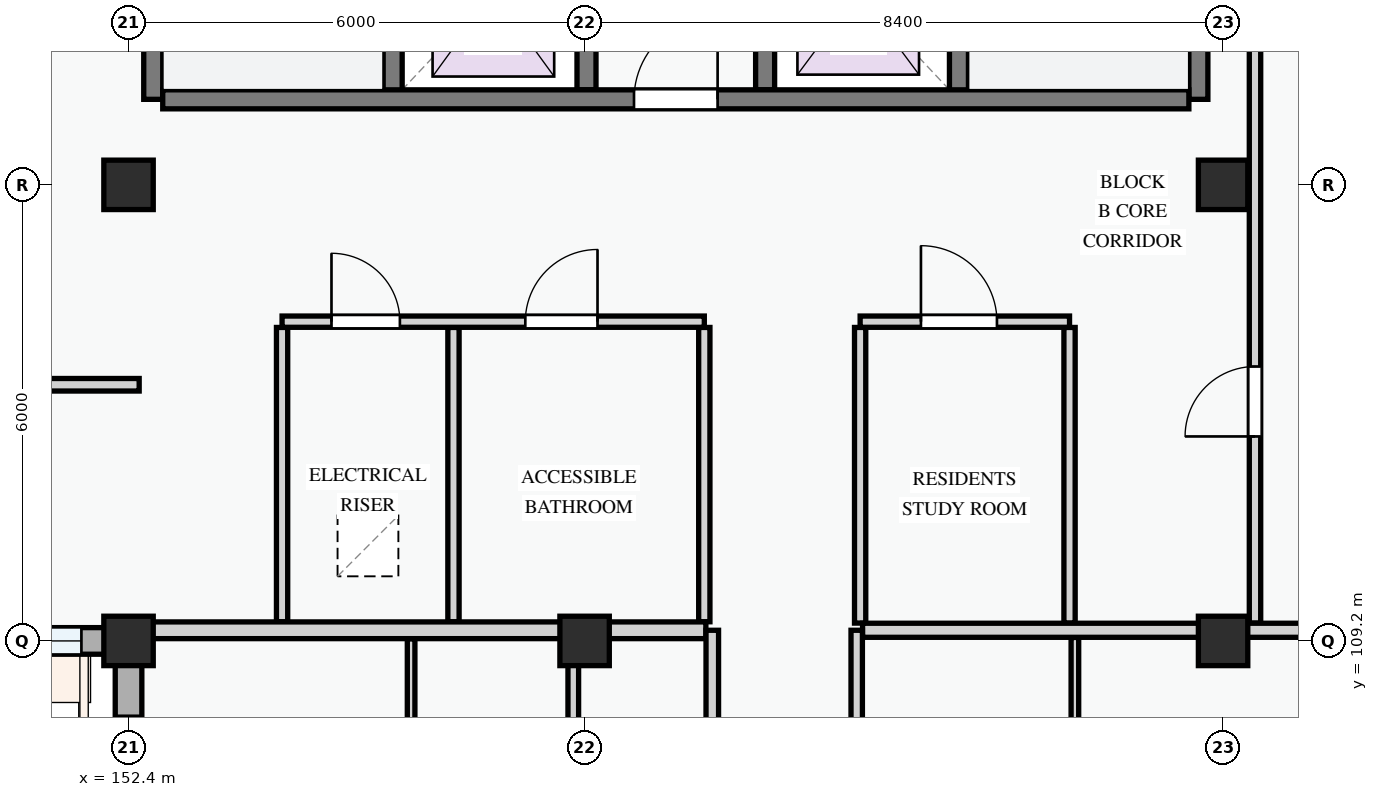
"""IFC4 building model, lengths in metres.
Left out: names, types, materials, properties, quantities, classifications, styles, units other than length and angle.
Written with IfcOpenShell. Run it as: python <this file> out.ifc"""

import sys

from ifc_helpers import new_model, si_unit, direction, frame, frame_2d, origin, origin_2d, place, context, subcontext, project, spatial, rectangle, extrude, element, fill, save


model = new_model("IFC4")
c1 = context("Model", 3, precision=1e-05, world=origin(), true_north=direction((0.0, 1.0)))
c2 = subcontext(c1, "Body", "Model", "MODEL_VIEW")
j1 = project(units=[si_unit("LENGTHUNIT", "METRE"), si_unit("PLANEANGLEUNIT", "RADIAN")], contexts=[c1])
p1 = place(None, origin())
s1 = spatial("IfcSite", under=j1, at=p1, CompositionType="ELEMENT")
p2 = place(p1, origin())
s2 = spatial("IfcBuilding", under=s1, at=p2, CompositionType="ELEMENT")
p3 = place(p2, frame((0.0, 0.0, 11.4)))
s3 = spatial("IfcBuildingStorey", under=s2, at=p3, CompositionType="ELEMENT", Elevation=11.4)
for number, where, z_axis, x_axis in (
    (1, (152.4, 109.2, 0.0), (0.0, 0.0, 1.0), (1.0, 0.0, 0.0)),
    (2, (152.4, 115.2, 0.0), (0.0, 0.0, 1.0), (1.0, 0.0, 0.0)),
    (3, (158.4, 109.2, 0.0), (0.0, 0.0, 1.0), (1.0, 0.0, 0.0)),
    (4, (166.8, 109.2, 0.0), (0.0, 0.0, 1.0), (1.0, 0.0, 0.0)),
    (5, (166.8, 115.2, 0.0), (0.0, 0.0, 1.0), (1.0, 0.0, 0.0)),
):
    element("IfcColumn", number, at=place(p3, frame(where, z_axis=z_axis, x_axis=x_axis)), inside=s3, PredefinedType="COLUMN", context=c2, shape_type="SweptSolid", body=[
        extrude(rectangle(XDim=0.65, YDim=0.65, at=origin_2d()), origin(), (0.0, 0.0, 1.0), 3.3),
    ])
p4 = place(p3, frame((144.0, 109.2, 0.0), z_axis=(0.0, 0.0, 1.0), x_axis=(1.0, 0.0, 0.0)))
e6 = element("IfcWall", 6, at=p4, inside=s3, PredefinedType="STANDARD", context=c2, shape_type="SweptSolid", body=[
    extrude(rectangle(XDim=8.4, YDim=0.35, at=frame_2d((4.2, 0.0))), origin(), (0.0, 0.0, 1.0), 2.375),
])
p5 = place(p4, frame((0.99, 0.0, 0.78)))
e7 = element("IfcOpeningElement", 7, at=p5, cuts=e6, PredefinedType="OPENING", context=c2, shape_type="SweptSolid", body=[
    extrude(rectangle(XDim=1.4, YDim=1.45, at=frame_2d((0.7, 0.725))), frame((0.0, 0.185, 0.0), z_axis=(0.0, -1.0, 0.0), x_axis=(1.0, 0.0, 0.0)), (0.0, 0.0, 1.0), 0.37),
])
p6 = place(p4, frame((3.925, 0.0, 0.78)))
e8 = element("IfcOpeningElement", 8, at=p6, cuts=e6, PredefinedType="OPENING", context=c2, shape_type="SweptSolid", body=[
    extrude(rectangle(XDim=1.25, YDim=1.45, at=frame_2d((0.625, 0.725))), frame((0.0, 0.185, 0.0), z_axis=(0.0, -1.0, 0.0), x_axis=(1.0, 0.0, 0.0)), (0.0, 0.0, 1.0), 0.37),
])
p7 = place(p4, frame((6.48, 0.0, 0.78)))
e9 = element("IfcOpeningElement", 9, at=p7, cuts=e6, PredefinedType="OPENING", context=c2, shape_type="SweptSolid", body=[
    extrude(rectangle(XDim=1.3, YDim=1.4, at=frame_2d((0.65, 0.7))), frame((0.0, 0.185, 0.0), z_axis=(0.0, -1.0, 0.0), x_axis=(1.0, 0.0, 0.0)), (0.0, 0.0, 1.0), 0.37),
])
p8 = place(p3, frame((152.4, 109.2, 0.0), z_axis=(0.0, 0.0, 1.0), x_axis=(0.0, -1.0, 0.0)))
e10 = element("IfcWall", 10, at=p8, inside=s3, PredefinedType="STANDARD", context=c2, shape_type="SweptSolid", body=[
    extrude(rectangle(XDim=8.4, YDim=0.35, at=frame_2d((4.2, 0.0))), origin(), (0.0, 0.0, 1.0), 2.425),
])
p9 = place(p8, frame((0.985, 0.0, 0.78)))
e11 = element("IfcOpeningElement", 11, at=p9, cuts=e10, PredefinedType="OPENING", context=c2, shape_type="SweptSolid", body=[
    extrude(rectangle(XDim=0.9, YDim=1.2, at=frame_2d((0.45, 0.6))), frame((0.0, 0.185, 0.0), z_axis=(0.0, -1.0, 0.0), x_axis=(1.0, 0.0, 0.0)), (0.0, 0.0, 1.0), 0.37),
])
p10 = place(p8, frame((3.035, 0.0, 0.78)))
e12 = element("IfcOpeningElement", 12, at=p10, cuts=e10, PredefinedType="OPENING", context=c2, shape_type="SweptSolid", body=[
    extrude(rectangle(XDim=1.5, YDim=1.5, at=frame_2d((0.75, 0.75))), frame((0.0, 0.185, 0.0), z_axis=(0.0, -1.0, 0.0), x_axis=(1.0, 0.0, 0.0)), (0.0, 0.0, 1.0), 0.37),
])
p11 = place(p8, frame((5.93, 0.0, 0.78)))
e13 = element("IfcOpeningElement", 13, at=p11, cuts=e10, PredefinedType="OPENING", context=c2, shape_type="SweptSolid", body=[
    extrude(rectangle(XDim=1.38, YDim=1.48, at=frame_2d((0.69, 0.74))), frame((0.0, 0.185, 0.0), z_axis=(0.0, -1.0, 0.0), x_axis=(1.0, 0.0, 0.0)), (0.0, 0.0, 1.0), 0.37),
])
p12 = place(p3, frame((155.875, 123.25, 0.0), z_axis=(0.0, 0.0, 1.0), x_axis=(0.0, -1.0, 0.0)))
e14 = element("IfcWall", 14, at=p12, inside=s3, PredefinedType="SHEAR", context=c2, shape_type="SweptSolid", body=[
    extrude(rectangle(XDim=6.925, YDim=0.25, at=frame_2d((3.462, 0.0))), origin(), (0.0, 0.0, 1.0), 3.0),
])
p13 = place(p12, frame((0.35, 0.0, 0.0)))
e15 = element("IfcOpeningElement", 15, at=p13, cuts=e14, PredefinedType="OPENING", context=c2, shape_type="SweptSolid", body=[
    extrude(rectangle(XDim=0.95, YDim=2.1, at=frame_2d((0.475, 1.05))), frame((0.0, 0.135, 0.0), z_axis=(0.0, -1.0, 0.0), x_axis=(1.0, 0.0, 0.0)), (0.0, 0.0, 1.0), 0.27),
])
p14 = place(p3, frame((152.725, 123.4, 0.0), z_axis=(0.0, 0.0, 1.0), x_axis=(0.0, -1.0, 0.0)))
e16 = element("IfcWall", 16, at=p14, inside=s3, PredefinedType="SHEAR", context=c2, shape_type="SweptSolid", body=[
    extrude(rectangle(XDim=7.075, YDim=0.25, at=frame_2d((3.538, 0.0))), origin(), (0.0, 0.0, 1.0), 3.0),
])
p15 = place(p3, frame((166.475, 123.25, 0.0), z_axis=(0.0, 0.0, 1.0), x_axis=(0.0, -1.0, 0.0)))
e17 = element("IfcWall", 17, at=p15, inside=s3, PredefinedType="SHEAR", context=c2, shape_type="SweptSolid", body=[
    extrude(rectangle(XDim=6.925, YDim=0.25, at=frame_2d((3.462, 0.0))), origin(), (0.0, 0.0, 1.0), 3.0),
])
p16 = place(p3, frame((163.325, 123.25, 0.0), z_axis=(0.0, 0.0, 1.0), x_axis=(0.0, -1.0, 0.0)))
e18 = element("IfcWall", 18, at=p16, inside=s3, PredefinedType="SHEAR", context=c2, shape_type="SweptSolid", body=[
    extrude(rectangle(XDim=6.925, YDim=0.25, at=frame_2d((3.462, 0.0))), origin(), (0.0, 0.0, 1.0), 3.0),
])
p17 = place(p16, frame((0.35, 0.0, 0.0)))
e19 = element("IfcOpeningElement", 19, at=p17, cuts=e18, PredefinedType="OPENING", context=c2, shape_type="SweptSolid", body=[
    extrude(rectangle(XDim=0.95, YDim=2.1, at=frame_2d((0.475, 1.05))), frame((0.0, 0.135, 0.0), z_axis=(0.0, -1.0, 0.0), x_axis=(1.0, 0.0, 0.0)), (0.0, 0.0, 1.0), 0.27),
])
for number, where, z_axis, x_axis in (
    (20, (158.425, 118.875, 0.0), (0.0, 0.0, 1.0), (0.0, -1.0, 0.0)),
    (21, (160.775, 118.875, 0.0), (0.0, 0.0, 1.0), (0.0, -1.0, 0.0)),
):
    element("IfcWall", number, at=place(p3, frame(where, z_axis=z_axis, x_axis=x_axis)), inside=s3, PredefinedType="SHEAR", context=c2, shape_type="SweptSolid", body=[
        extrude(rectangle(XDim=2.425, YDim=0.25, at=frame_2d((1.212, 0.0))), origin(), (0.0, 0.0, 1.0), 3.0),
    ])
p18 = place(p3, frame((152.85, 116.325, 0.0), z_axis=(0.0, 0.0, 1.0), x_axis=(1.0, 0.0, 0.0)))
e22 = element("IfcWall", 22, at=p18, inside=s3, PredefinedType="SHEAR", context=c2, shape_type="SweptSolid", body=[
    extrude(rectangle(XDim=13.5, YDim=0.25, at=frame_2d((6.75, 0.0))), origin(), (0.0, 0.0, 1.0), 3.0),
])
p19 = place(p18, frame((6.2, 0.0, 0.0)))
e23 = element("IfcOpeningElement", 23, at=p19, cuts=e22, PredefinedType="OPENING", context=c2, shape_type="SweptSolid", body=[
    extrude(rectangle(XDim=1.1, YDim=2.15, at=frame_2d((0.55, 1.075))), frame((0.0, 0.135, 0.0), z_axis=(0.0, -1.0, 0.0), x_axis=(1.0, 0.0, 0.0)), (0.0, 0.0, 1.0), 0.27),
])
for number, where, z_axis, x_axis in (
    (24, (154.42, 113.324, 0.0), (0.0, 0.0, 1.0), (0.0, -1.0, 0.0)),
    (25, (156.675, 113.324, 0.0), (0.0, 0.0, 1.0), (0.0, -1.0, 0.0)),
    (26, (159.975, 113.324, 0.0), (0.0, 0.0, 1.0), (0.0, -1.0, 0.0)),
):
    element("IfcWall", number, at=place(p3, frame(where, z_axis=z_axis, x_axis=x_axis)), inside=s3, PredefinedType="PARTITIONING", context=c2, shape_type="SweptSolid", body=[
        extrude(rectangle(XDim=3.872, YDim=0.148, at=frame_2d((1.936, 0.0))), origin(), (0.0, 0.0, 1.0), 3.0),
    ])
for number, where, z_axis, x_axis in (
    (27, (162.025, 113.324, 0.0), (0.0, 0.0, 1.0), (0.0, -1.0, 0.0)),
    (28, (164.78, 113.324, 0.0), (0.0, 0.0, 1.0), (0.0, -1.0, 0.0)),
):
    element("IfcWall", number, at=place(p3, frame(where, z_axis=z_axis, x_axis=x_axis)), inside=s3, PredefinedType="PARTITIONING", context=c2, shape_type="SweptSolid", body=[
        extrude(rectangle(XDim=3.889, YDim=0.148, at=frame_2d((1.945, 0.0))), origin(), (0.0, 0.0, 1.0), 3.0),
    ])
p20 = place(p3, frame((154.42, 113.4, 0.0), z_axis=(0.0, 0.0, 1.0), x_axis=(1.0, 0.0, 0.0)))
e29 = element("IfcWall", 29, at=p20, inside=s3, PredefinedType="PARTITIONING", context=c2, shape_type="SweptSolid", body=[
    extrude(rectangle(XDim=5.555, YDim=0.148, at=frame_2d((2.778, 0.0))), origin(), (0.0, 0.0, 1.0), 3.0),
])
p21 = place(p20, frame((0.65, 0.0, 0.0)))
e30 = element("IfcOpeningElement", 30, at=p21, cuts=e29, PredefinedType="OPENING", context=c2, shape_type="SweptSolid", body=[
    extrude(rectangle(XDim=0.9, YDim=2.1, at=frame_2d((0.45, 1.05))), frame((0.0, 0.084, 0.0), z_axis=(0.0, -1.0, 0.0), x_axis=(1.0, 0.0, 0.0)), (0.0, 0.0, 1.0), 0.168),
])
p22 = place(p20, frame((3.2, 0.0, 0.0)))
e31 = element("IfcOpeningElement", 31, at=p22, cuts=e29, PredefinedType="OPENING", context=c2, shape_type="SweptSolid", body=[
    extrude(rectangle(XDim=0.95, YDim=2.1, at=frame_2d((0.475, 1.05))), frame((0.0, 0.084, 0.0), z_axis=(0.0, -1.0, 0.0), x_axis=(1.0, 0.0, 0.0)), (0.0, 0.0, 1.0), 0.168),
])
p23 = place(p3, frame((162.025, 113.4, 0.0), z_axis=(0.0, 0.0, 1.0), x_axis=(1.0, 0.0, 0.0)))
e32 = element("IfcWall", 32, at=p23, inside=s3, PredefinedType="PARTITIONING", context=c2, shape_type="SweptSolid", body=[
    extrude(rectangle(XDim=2.755, YDim=0.148, at=frame_2d((1.377, 0.0))), origin(), (0.0, 0.0, 1.0), 3.0),
])
p24 = place(p23, frame((0.8, 0.0, 0.0)))
e33 = element("IfcOpeningElement", 33, at=p24, cuts=e32, PredefinedType="OPENING", context=c2, shape_type="SweptSolid", body=[
    extrude(rectangle(XDim=1.0, YDim=2.15, at=frame_2d((0.5, 1.075))), frame((0.0, 0.084, 0.0), z_axis=(0.0, -1.0, 0.0), x_axis=(1.0, 0.0, 0.0)), (0.0, 0.0, 1.0), 0.168),
])
p25 = place(p3, frame((150.127, 112.57, 0.0), z_axis=(0.0, 0.0, 1.0), x_axis=(1.0, 0.0, 0.0)))
e34 = element("IfcWall", 34, at=p25, inside=s3, PredefinedType="PARTITIONING", context=c2, shape_type="SweptSolid", body=[
    extrude(rectangle(XDim=2.413, YDim=0.165, at=frame_2d((1.207, 0.0))), origin(), (0.0, 0.0, 1.0), 3.0),
])
p26 = place(p3, frame((167.22, 109.435, 0.0), z_axis=(0.0, 0.0, 1.0), x_axis=(0.0, 1.0, 0.0)))
e35 = element("IfcWall", 35, at=p26, inside=s3, PredefinedType="PARTITIONING", context=c2, shape_type="SweptSolid", body=[
    extrude(rectangle(XDim=13.989, YDim=0.15, at=frame_2d((6.994, 0.0))), origin(), (0.0, 0.0, 1.0), 2.425),
])
p27 = place(p26, frame((2.456, 0.0, 0.0)))
e36 = element("IfcOpeningElement", 36, at=p27, cuts=e35, PredefinedType="OPENING", context=c2, shape_type="SweptSolid", body=[
    extrude(rectangle(XDim=0.92, YDim=2.1, at=frame_2d((0.46, 1.05))), frame((0.0, 0.085, 0.0), z_axis=(0.0, -1.0, 0.0), x_axis=(1.0, 0.0, 0.0)), (0.0, 0.0, 1.0), 0.17),
])
p28 = place(p3, frame((156.118, 104.229, 0.0), z_axis=(0.0, 0.0, 1.0), x_axis=(0.0, 1.0, 0.0)))
e37 = element("IfcWall", 37, at=p28, inside=s3, PredefinedType="PARTITIONING", context=c2, shape_type="SweptSolid", body=[
    extrude(rectangle(XDim=4.999, YDim=0.1, at=frame_2d((2.499, 0.0))), origin(), (0.0, 0.0, 1.0), 3.0),
])
p29 = place(p3, frame((158.251, 104.229, 0.0), z_axis=(0.0, 0.0, 1.0), x_axis=(0.0, 1.0, 0.0)))
e38 = element("IfcWall", 38, at=p29, inside=s3, PredefinedType="PARTITIONING", context=c2, shape_type="SweptSolid", body=[
    extrude(rectangle(XDim=4.999, YDim=0.14, at=frame_2d((2.499, 0.0))), origin(), (0.0, 0.0, 1.0), 2.425),
])
p30 = place(p3, frame((164.85, 104.028, 0.0), z_axis=(0.0, 0.0, 1.0), x_axis=(0.0, 1.0, 0.0)))
e39 = element("IfcWall", 39, at=p30, inside=s3, PredefinedType="PARTITIONING", context=c2, shape_type="SweptSolid", body=[
    extrude(rectangle(XDim=5.218, YDim=0.1, at=frame_2d((2.609, 0.0))), origin(), (0.0, 0.0, 1.0), 3.0),
])
p31 = place(p3, frame((152.46, 109.34, 0.0), z_axis=(0.0, 0.0, 1.0), x_axis=(1.0, 0.0, 0.0)))
e40 = element("IfcWall", 40, at=p31, inside=s3, PredefinedType="PARTITIONING", context=c2, shape_type="SweptSolid", body=[
    extrude(rectangle(XDim=7.536, YDim=0.22, at=frame_2d((3.768, 0.0))), origin(), (0.0, 0.0, 1.0), 2.375),
])
p32 = place(p3, frame((162.057, 109.34, 0.0), z_axis=(0.0, 0.0, 1.0), x_axis=(1.0, 0.0, 0.0)))
e41 = element("IfcWall", 41, at=p32, inside=s3, PredefinedType="PARTITIONING", context=c2, shape_type="SweptSolid", body=[
    extrude(rectangle(XDim=11.766, YDim=0.185, at=frame_2d((5.883, 0.0))), origin(), (0.0, 0.0, 1.0), 2.375),
])
p33 = place(p3, frame((160.08, 80.46, 0.0), z_axis=(0.0, 0.0, 1.0), x_axis=(0.0, 1.0, 0.0)))
e42 = element("IfcWall", 42, at=p33, inside=s3, PredefinedType="PARTITIONING", context=c2, shape_type="SweptSolid", body=[
    extrude(rectangle(XDim=28.88, YDim=0.165, at=frame_2d((14.44, 0.0))), origin(), (0.0, 0.0, 1.0), 3.0),
])
p34 = place(p33, frame((2.484, 0.0, 0.0)))
e43 = element("IfcOpeningElement", 43, at=p34, cuts=e42, PredefinedType="OPENING", context=c2, shape_type="SweptSolid", body=[
    extrude(rectangle(XDim=0.92, YDim=2.1, at=frame_2d((0.46, 1.05))), frame((0.0, 0.093, 0.0), z_axis=(0.0, -1.0, 0.0), x_axis=(1.0, 0.0, 0.0)), (0.0, 0.0, 1.0), 0.185),
])
p35 = place(p33, frame((10.07, 0.0, 0.0)))
e44 = element("IfcOpeningElement", 44, at=p35, cuts=e42, PredefinedType="OPENING", context=c2, shape_type="SweptSolid", body=[
    extrude(rectangle(XDim=0.92, YDim=2.1, at=frame_2d((0.46, 1.05))), frame((0.0, 0.093, 0.0), z_axis=(0.0, -1.0, 0.0), x_axis=(1.0, 0.0, 0.0)), (0.0, 0.0, 1.0), 0.185),
])
p36 = place(p33, frame((22.5, 0.0, 0.0)))
e45 = element("IfcOpeningElement", 45, at=p36, cuts=e42, PredefinedType="OPENING", context=c2, shape_type="SweptSolid", body=[
    extrude(rectangle(XDim=0.92, YDim=2.1, at=frame_2d((0.46, 1.05))), frame((0.0, 0.093, 0.0), z_axis=(0.0, -1.0, 0.0), x_axis=(1.0, 0.0, 0.0)), (0.0, 0.0, 1.0), 0.185),
])
p37 = place(p3, frame((161.98, 80.46, 0.0), z_axis=(0.0, 0.0, 1.0), x_axis=(0.0, 1.0, 0.0)))
e46 = element("IfcWall", 46, at=p37, inside=s3, PredefinedType="PARTITIONING", context=c2, shape_type="SweptSolid", body=[
    extrude(rectangle(XDim=28.88, YDim=0.15, at=frame_2d((14.44, 0.0))), origin(), (0.0, 0.0, 1.0), 3.0),
])
p38 = place(p37, frame((2.487, 0.0, 0.0)))
e47 = element("IfcOpeningElement", 47, at=p38, cuts=e46, PredefinedType="OPENING", context=c2, shape_type="SweptSolid", body=[
    extrude(rectangle(XDim=0.96, YDim=2.12, at=frame_2d((0.48, 1.06))), frame((0.0, 0.085, 0.0), z_axis=(0.0, -1.0, 0.0), x_axis=(1.0, 0.0, 0.0)), (0.0, 0.0, 1.0), 0.17),
])
p39 = place(p37, frame((10.07, 0.0, 0.0)))
e48 = element("IfcOpeningElement", 48, at=p39, cuts=e46, PredefinedType="OPENING", context=c2, shape_type="SweptSolid", body=[
    extrude(rectangle(XDim=0.92, YDim=2.1, at=frame_2d((0.46, 1.05))), frame((0.0, 0.085, 0.0), z_axis=(0.0, -1.0, 0.0), x_axis=(1.0, 0.0, 0.0)), (0.0, 0.0, 1.0), 0.17),
])
p40 = place(p37, frame((22.293, 0.0, 0.0)))
e49 = element("IfcOpeningElement", 49, at=p40, cuts=e46, PredefinedType="OPENING", context=c2, shape_type="SweptSolid", body=[
    extrude(rectangle(XDim=0.92, YDim=2.1, at=frame_2d((0.46, 1.05))), frame((0.0, 0.085, 0.0), z_axis=(0.0, -1.0, 0.0), x_axis=(1.0, 0.0, 0.0)), (0.0, 0.0, 1.0), 0.17),
])
p41 = place(p7, origin())
e50 = element("IfcWindow", 50, at=p41, inside=s3, PartitioningType="SINGLE_PANEL", PredefinedType="WINDOW", context=c2, shape_type="SweptSolid", body=[
    extrude(rectangle(XDim=1.3, YDim=1.4, at=frame_2d((0.65, 0.7))), frame((0.0, 0.03, 0.0), z_axis=(0.0, -1.0, 0.0), x_axis=(1.0, 0.0, 0.0)), (0.0, 0.0, 1.0), 0.06),
])
fill(e9, e50)
p42 = place(p9, origin())
e51 = element("IfcWindow", 51, at=p42, inside=s3, PartitioningType="SINGLE_PANEL", PredefinedType="WINDOW", context=c2, shape_type="SweptSolid", body=[
    extrude(rectangle(XDim=0.9, YDim=1.2, at=frame_2d((0.45, 0.6))), frame((0.0, 0.03, 0.0), z_axis=(0.0, -1.0, 0.0), x_axis=(1.0, 0.0, 0.0)), (0.0, 0.0, 1.0), 0.06),
])
fill(e11, e51)
p43 = place(p19, origin())
e52 = element("IfcDoor", 52, at=p43, inside=s3, OperationType="SINGLE_SWING_RIGHT", PredefinedType="DOOR", context=c2, shape_type="SweptSolid", body=[
    extrude(rectangle(XDim=1.1, YDim=2.15, at=frame_2d((0.55, 1.075))), frame((0.0, 0.025, 0.0), z_axis=(0.0, -1.0, 0.0), x_axis=(1.0, 0.0, 0.0)), (0.0, 0.0, 1.0), 0.05),
])
fill(e23, e52)
p44 = place(p21, origin())
e53 = element("IfcDoor", 53, at=p44, inside=s3, OperationType="SINGLE_SWING_LEFT", PredefinedType="DOOR", context=c2, shape_type="SweptSolid", body=[
    extrude(rectangle(XDim=0.9, YDim=2.1, at=frame_2d((0.45, 1.05))), frame((0.0, 0.025, 0.0), z_axis=(0.0, -1.0, 0.0), x_axis=(1.0, 0.0, 0.0)), (0.0, 0.0, 1.0), 0.05),
])
fill(e30, e53)
p45 = place(p22, origin())
e54 = element("IfcDoor", 54, at=p45, inside=s3, OperationType="SINGLE_SWING_RIGHT", PredefinedType="DOOR", context=c2, shape_type="SweptSolid", body=[
    extrude(rectangle(XDim=0.95, YDim=2.1, at=frame_2d((0.475, 1.05))), frame((0.0, 0.025, 0.0), z_axis=(0.0, -1.0, 0.0), x_axis=(1.0, 0.0, 0.0)), (0.0, 0.0, 1.0), 0.05),
])
fill(e31, e54)
p46 = place(p24, origin())
e55 = element("IfcDoor", 55, at=p46, inside=s3, OperationType="SINGLE_SWING_LEFT", PredefinedType="DOOR", context=c2, shape_type="SweptSolid", body=[
    extrude(rectangle(XDim=1.0, YDim=2.15, at=frame_2d((0.5, 1.075))), frame((0.0, 0.025, 0.0), z_axis=(0.0, -1.0, 0.0), x_axis=(1.0, 0.0, 0.0)), (0.0, 0.0, 1.0), 0.05),
])
fill(e33, e55)
p47 = place(p27, origin())
e56 = element("IfcDoor", 56, at=p47, inside=s3, OperationType="SINGLE_SWING_LEFT", PredefinedType="DOOR", context=c2, shape_type="SweptSolid", body=[
    extrude(rectangle(XDim=0.92, YDim=2.1, at=frame_2d((0.46, 1.05))), frame((0.0, 0.025, 0.0), z_axis=(0.0, -1.0, 0.0), x_axis=(1.0, 0.0, 0.0)), (0.0, 0.0, 1.0), 0.05),
])
fill(e36, e56)
save(model, sys.argv[1])
